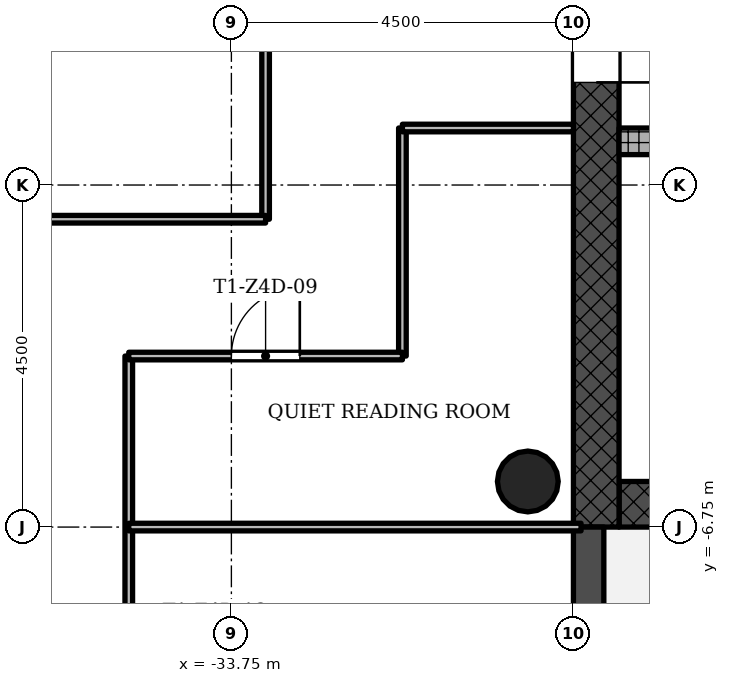
"""IFC4 building model, lengths in metres.
Left out: names, types, materials, properties, quantities, classifications, styles, units other than length and angle.
Written with IfcOpenShell. Run it as: python <this file> out.ifc"""

import sys

from ifc_helpers import new_model, si_unit, direction, frame, frame_2d, origin, origin_2d, place, context, subcontext, project, spatial, rectangle, hollow_circle, extrude, element, fill, save


model = new_model("IFC4")
c1 = context("Model", 3, precision=1e-05, world=origin(), true_north=direction((0.0, 1.0)))
c2 = subcontext(c1, "Body", "Model", "MODEL_VIEW")
j1 = project(units=[si_unit("LENGTHUNIT", "METRE"), si_unit("PLANEANGLEUNIT", "RADIAN")], contexts=[c1])
p1 = place(None, origin())
s1 = spatial("IfcSite", under=j1, at=p1, CompositionType="ELEMENT")
p2 = place(p1, origin())
s2 = spatial("IfcBuilding", under=s1, at=p2, CompositionType="ELEMENT")
p3 = place(p2, frame((0.0, 0.0, 199.4)))
s3 = spatial("IfcBuildingStorey", under=s2, at=p3, CompositionType="ELEMENT", Elevation=199.4)
p4 = place(p3, frame((-28.65, -6.45, 0.0), z_axis=(0.0, 0.0, 1.0), x_axis=(1.0, 0.0, 0.0)))
e1 = element("IfcWall", 1, at=p4, inside=s3, PredefinedType="SHEAR", context=c2, shape_type="SweptSolid", body=[
    extrude(rectangle(XDim=8.4, YDim=0.6, at=frame_2d((4.2, 0.0))), origin(), (0.0, 0.0, 1.0), 3.4),
])
p5 = place(p3, frame((-28.95, 6.15, 0.0), z_axis=(0.0, 0.0, 1.0), x_axis=(0.0, -1.0, 0.0)))
e2 = element("IfcWall", 2, at=p5, inside=s3, PredefinedType="SHEAR", context=c2, shape_type="SweptSolid", body=[
    extrude(rectangle(XDim=12.9, YDim=0.6, at=frame_2d((6.45, 0.0))), origin(), (0.0, 0.0, 1.0), 3.4),
])
p6 = place(p5, frame((5.25, 0.0, 0.0)))
e3 = element("IfcOpeningElement", 3, at=p6, cuts=e2, PredefinedType="OPENING", context=c2, shape_type="SweptSolid", body=[
    extrude(rectangle(XDim=1.8, YDim=2.1, at=frame_2d((0.9, 1.05))), frame((0.0, 0.31, 0.0), z_axis=(0.0, -1.0, 0.0), x_axis=(1.0, 0.0, 0.0)), (0.0, 0.0, 1.0), 0.62),
])
p7 = place(p3, frame((-28.65, -1.675, 0.0), z_axis=(0.0, 0.0, 1.0), x_axis=(1.0, 0.0, 0.0)))
e4 = element("IfcWall", 4, at=p7, inside=s3, PredefinedType="SHEAR", context=c2, shape_type="SweptSolid", body=[
    extrude(rectangle(XDim=7.8, YDim=0.35, at=frame_2d((3.9, 0.0))), origin(), (0.0, 0.0, 1.0), 3.4),
])
p8 = place(p7, frame((1.15, 0.0, 0.0)))
e5 = element("IfcOpeningElement", 5, at=p8, cuts=e4, PredefinedType="OPENING", context=c2, shape_type="SweptSolid", body=[
    extrude(rectangle(XDim=1.1, YDim=2.1, at=frame_2d((0.55, 1.05))), frame((0.0, 0.185, 0.0), z_axis=(0.0, -1.0, 0.0), x_axis=(1.0, 0.0, 0.0)), (0.0, 0.0, 1.0), 0.37),
])
p9 = place(p7, frame((3.35, 0.0, 0.0)))
e6 = element("IfcOpeningElement", 6, at=p9, cuts=e4, PredefinedType="OPENING", context=c2, shape_type="SweptSolid", body=[
    extrude(rectangle(XDim=1.1, YDim=2.1, at=frame_2d((0.55, 1.05))), frame((0.0, 0.185, 0.0), z_axis=(0.0, -1.0, 0.0), x_axis=(1.0, 0.0, 0.0)), (0.0, 0.0, 1.0), 0.37),
])
p10 = place(p7, frame((5.55, 0.0, 0.0)))
e7 = element("IfcOpeningElement", 7, at=p10, cuts=e4, PredefinedType="OPENING", context=c2, shape_type="SweptSolid", body=[
    extrude(rectangle(XDim=1.1, YDim=2.1, at=frame_2d((0.55, 1.05))), frame((0.0, 0.185, 0.0), z_axis=(0.0, -1.0, 0.0), x_axis=(1.0, 0.0, 0.0)), (0.0, 0.0, 1.0), 0.37),
])
p11 = place(p3, frame((-29.85, -6.15, 0.0), z_axis=(0.0, 0.0, 1.0), x_axis=(1.0, 0.0, 0.0)))
e8 = element("IfcColumn", 8, at=p11, inside=s3, PredefinedType="COLUMN", context=c2, shape_type="SweptSolid", body=[
    extrude(hollow_circle(Radius=0.4, WallThickness=0.028, at=origin_2d()), origin(), (0.0, 0.0, 1.0), 3.4),
])
p12 = place(p3, frame((-29.05, -11.25, -0.02), z_axis=(0.0, 0.0, 1.0), x_axis=(0.0, 1.0, 0.0)))
e9 = element("IfcWall", 9, at=p12, inside=s3, PredefinedType="STANDARD", context=c2, shape_type="SweptSolid", body=[
    extrude(rectangle(XDim=4.5, YDim=0.4, at=frame_2d((2.25, 0.0))), origin(), (0.0, 0.0, 1.0), 3.12),
])
p13 = place(p12, frame((1.35, 0.0, 0.02)))
e10 = element("IfcOpeningElement", 10, at=p13, cuts=e9, PredefinedType="OPENING", context=c2, shape_type="SweptSolid", body=[
    extrude(rectangle(XDim=1.8, YDim=2.1, at=frame_2d((0.9, 1.05))), frame((0.0, 0.21, 0.0), z_axis=(0.0, -1.0, 0.0), x_axis=(1.0, 0.0, 0.0)), (0.0, 0.0, 1.0), 0.42),
])
p14 = place(p3, frame((-35.1, -11.25, 0.0), z_axis=(0.0, 0.0, 1.0), x_axis=(0.0, 1.0, 0.0)))
e11 = element("IfcWall", 11, at=p14, inside=s3, PredefinedType="PARTITIONING", context=c2, shape_type="SweptSolid", body=[
    extrude(rectangle(XDim=6.75, YDim=0.1, at=frame_2d((3.375, 0.0))), origin(), (0.0, 0.0, 1.0), 3.0),
])
p15 = place(p14, frame((1.8, 0.0, 0.0)))
e12 = element("IfcOpeningElement", 12, at=p15, cuts=e11, PredefinedType="OPENING", context=c2, shape_type="SweptSolid", body=[
    extrude(rectangle(XDim=0.9, YDim=2.1, at=frame_2d((0.45, 1.05))), frame((0.0, 0.06, 0.0), z_axis=(0.0, -1.0, 0.0), x_axis=(1.0, 0.0, 0.0)), (0.0, 0.0, 1.0), 0.12),
])
p16 = place(p3, frame((-33.3, -2.7, 0.0), z_axis=(0.0, 0.0, 1.0), x_axis=(0.0, 1.0, 0.0)))
e13 = element("IfcWall", 13, at=p16, inside=s3, PredefinedType="PARTITIONING", context=c2, shape_type="SweptSolid", body=[
    extrude(rectangle(XDim=5.4, YDim=0.1, at=frame_2d((2.7, 0.0))), origin(), (0.0, 0.0, 1.0), 3.0),
])
p17 = place(p16, frame((2.25, 0.0, 0.0)))
e14 = element("IfcOpeningElement", 14, at=p17, cuts=e13, PredefinedType="OPENING", context=c2, shape_type="SweptSolid", body=[
    extrude(rectangle(XDim=0.9, YDim=2.1, at=frame_2d((0.45, 1.05))), frame((0.0, 0.06, 0.0), z_axis=(0.0, -1.0, 0.0), x_axis=(1.0, 0.0, 0.0)), (0.0, 0.0, 1.0), 0.12),
])
p18 = place(p3, frame((-31.5, -4.5, 0.0), z_axis=(0.0, 0.0, 1.0), x_axis=(0.0, 1.0, 0.0)))
e15 = element("IfcWall", 15, at=p18, inside=s3, PredefinedType="PARTITIONING", context=c2, shape_type="SweptSolid", body=[
    extrude(rectangle(XDim=3.0, YDim=0.1, at=frame_2d((1.5, 0.0))), origin(), (0.0, 0.0, 1.0), 3.0),
])
p19 = place(p3, frame((-35.1, -6.75, 0.0), z_axis=(0.0, 0.0, 1.0), x_axis=(1.0, 0.0, 0.0)))
e16 = element("IfcWall", 16, at=p19, inside=s3, PredefinedType="PARTITIONING", context=c2, shape_type="SweptSolid", body=[
    extrude(rectangle(XDim=5.95, YDim=0.1, at=frame_2d((2.975, 0.0))), origin(), (0.0, 0.0, 1.0), 3.0),
])
p20 = place(p3, frame((-35.1, -4.5, 0.0), z_axis=(0.0, 0.0, 1.0), x_axis=(1.0, 0.0, 0.0)))
e17 = element("IfcWall", 17, at=p20, inside=s3, PredefinedType="PARTITIONING", context=c2, shape_type="SweptSolid", body=[
    extrude(rectangle(XDim=3.6, YDim=0.1, at=frame_2d((1.8, 0.0))), origin(), (0.0, 0.0, 1.0), 3.0),
])
p21 = place(p20, frame((1.35, 0.0, 0.0)))
e18 = element("IfcOpeningElement", 18, at=p21, cuts=e17, PredefinedType="OPENING", context=c2, shape_type="SweptSolid", body=[
    extrude(rectangle(XDim=0.9, YDim=2.1, at=frame_2d((0.45, 1.05))), frame((0.0, 0.06, 0.0), z_axis=(0.0, -1.0, 0.0), x_axis=(1.0, 0.0, 0.0)), (0.0, 0.0, 1.0), 0.12),
])
p22 = place(p3, frame((-38.7, -2.7, 0.0), z_axis=(0.0, 0.0, 1.0), x_axis=(1.0, 0.0, 0.0)))
e19 = element("IfcWall", 19, at=p22, inside=s3, PredefinedType="PARTITIONING", context=c2, shape_type="SweptSolid", body=[
    extrude(rectangle(XDim=5.4, YDim=0.1, at=frame_2d((2.7, 0.0))), origin(), (0.0, 0.0, 1.0), 3.0),
])
p23 = place(p3, frame((-31.5, -1.5, 0.0), z_axis=(0.0, 0.0, 1.0), x_axis=(1.0, 0.0, 0.0)))
e20 = element("IfcWall", 20, at=p23, inside=s3, PredefinedType="PARTITIONING", context=c2, shape_type="SweptSolid", body=[
    extrude(rectangle(XDim=2.25, YDim=0.1, at=frame_2d((1.125, 0.0))), origin(), (0.0, 0.0, 1.0), 3.0),
])
p24 = place(p21, origin())
e21 = element("IfcDoor", 21, at=p24, inside=s3, OperationType="SINGLE_SWING_LEFT", PredefinedType="DOOR", context=c2, shape_type="SweptSolid", body=[
    extrude(rectangle(XDim=0.9, YDim=2.1, at=frame_2d((0.45, 1.05))), frame((0.0, 0.025, 0.0), z_axis=(0.0, -1.0, 0.0), x_axis=(1.0, 0.0, 0.0)), (0.0, 0.0, 1.0), 0.05),
])
fill(e18, e21)
p25 = place(p6, origin())
e22 = element("IfcDoor", 22, at=p25, inside=s3, OperationType="SINGLE_SWING_LEFT", PredefinedType="DOOR", context=c2, shape_type="SweptSolid", body=[
    extrude(rectangle(XDim=1.8, YDim=2.1, at=frame_2d((0.9, 1.05))), frame((0.0, 0.025, 0.0), z_axis=(0.0, -1.0, 0.0), x_axis=(1.0, 0.0, 0.0)), (0.0, 0.0, 1.0), 0.05),
])
fill(e3, e22)
save(model, sys.argv[1])
